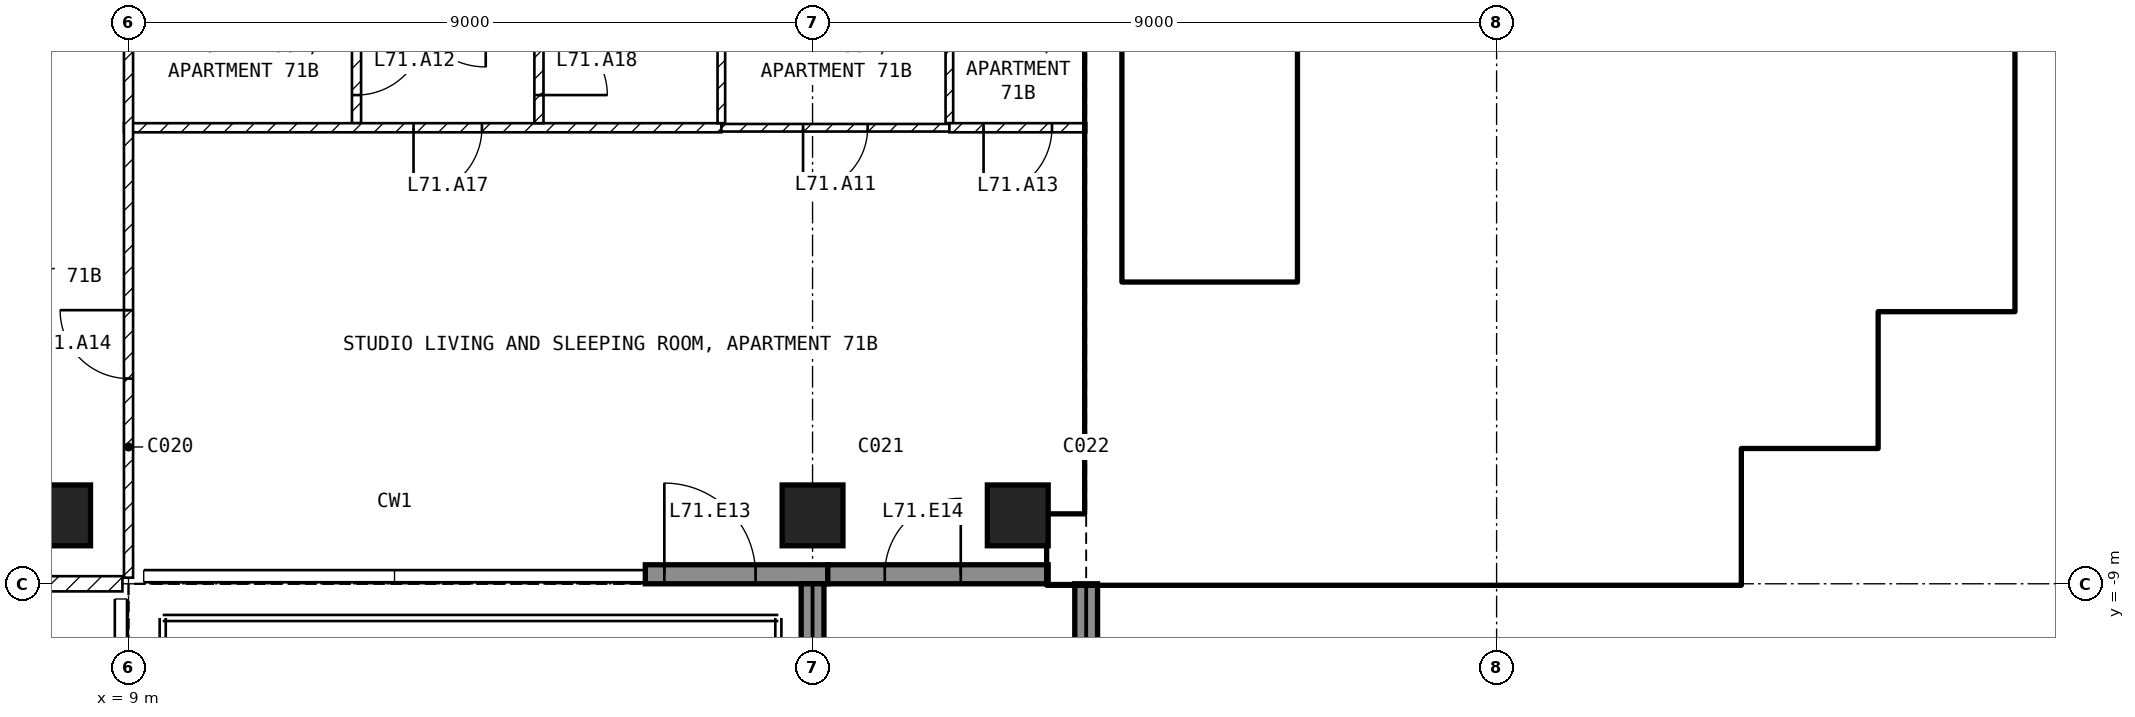
"""IFC4 building model, lengths in metres.
Left out: names, types, materials, properties, quantities, classifications, styles, units other than length and angle.
Written with IfcOpenShell. Run it as: python <this file> out.ifc"""

import sys

from ifc_helpers import new_model, si_unit, direction, frame, frame_2d, origin, origin_2d, place, context, subcontext, project, spatial, rectangle, extrude, element, fill, save


model = new_model("IFC4")
c1 = context("Model", 3, precision=1e-05, world=origin(), true_north=direction((0.0, 1.0)))
c2 = subcontext(c1, "Body", "Model", "MODEL_VIEW")
j1 = project(units=[si_unit("LENGTHUNIT", "METRE"), si_unit("PLANEANGLEUNIT", "RADIAN")], contexts=[c1])
p1 = place(None, origin())
s1 = spatial("IfcSite", under=j1, at=p1, CompositionType="ELEMENT")
p2 = place(p1, origin())
s2 = spatial("IfcBuilding", under=s1, at=p2, CompositionType="ELEMENT")
p3 = place(p2, frame((0.0, 0.0, 278.0)))
s3 = spatial("IfcBuildingStorey", under=s2, at=p3, CompositionType="ELEMENT", Elevation=278.0)
for number, where, z_axis, x_axis in (
    (1, (8.1, -8.1, -0.25), (0.0, 0.0, 1.0), (1.0, 0.0, 0.0)),
    (2, (18.0, -8.1, -0.25), (0.0, 0.0, 1.0), (1.0, 0.0, 0.0)),
    (3, (20.7, -8.1, -0.25), (0.0, 0.0, 1.0), (1.0, 0.0, 0.0)),
):
    element("IfcColumn", number, at=place(p3, frame(where, z_axis=z_axis, x_axis=x_axis)), inside=s3, PredefinedType="COLUMN", context=c2, shape_type="SweptSolid", body=[
        extrude(rectangle(XDim=0.8, YDim=0.8, at=origin_2d()), origin(), (0.0, 0.0, 1.0), 3.5),
    ])
p4 = place(p3, frame((15.8, -8.875, 0.0), z_axis=(0.0, 0.0, 1.0), x_axis=(1.0, 0.0, 0.0)))
e4 = element("IfcWall", 4, at=p4, inside=s3, PredefinedType="SOLIDWALL", context=c2, shape_type="SweptSolid", body=[
    extrude(rectangle(XDim=2.4, YDim=0.25, at=frame_2d((1.2, 0.0))), origin(), (0.0, 0.0, 1.0), 3.25),
])
p5 = place(p4, frame((0.25, 0.0, 0.0)))
e5 = element("IfcOpeningElement", 5, at=p5, cuts=e4, PredefinedType="OPENING", context=c2, shape_type="SweptSolid", body=[
    extrude(rectangle(XDim=1.2, YDim=2.4, at=frame_2d((0.6, 1.2))), frame((0.0, 0.135, 0.0), z_axis=(0.0, -1.0, 0.0), x_axis=(1.0, 0.0, 0.0)), (0.0, 0.0, 1.0), 0.27),
])
p6 = place(p3, frame((18.2, -8.875, 0.0), z_axis=(0.0, 0.0, 1.0), x_axis=(1.0, 0.0, 0.0)))
e6 = element("IfcWall", 6, at=p6, inside=s3, PredefinedType="SOLIDWALL", context=c2, shape_type="SweptSolid", body=[
    extrude(rectangle(XDim=2.9, YDim=0.25, at=frame_2d((1.45, 0.0))), origin(), (0.0, 0.0, 1.0), 3.25),
])
p7 = place(p6, frame((0.75, 0.0, 0.0)))
e7 = element("IfcOpeningElement", 7, at=p7, cuts=e6, PredefinedType="OPENING", context=c2, shape_type="SweptSolid", body=[
    extrude(rectangle(XDim=1.0, YDim=2.4, at=frame_2d((0.5, 1.2))), frame((0.0, 0.135, 0.0), z_axis=(0.0, -1.0, 0.0), x_axis=(1.0, 0.0, 0.0)), (0.0, 0.0, 1.0), 0.27),
])
p8 = place(p3, frame((18.0, -9.0, 0.0), z_axis=(0.0, 0.0, 1.0), x_axis=(0.0, -1.0, 0.0)))
e8 = element("IfcWall", 8, at=p8, inside=s3, PredefinedType="SOLIDWALL", context=c2, shape_type="SweptSolid", body=[
    extrude(rectangle(XDim=2.74, YDim=0.3, at=frame_2d((1.37, 0.0))), origin(), (0.0, 0.0, 1.0), 3.25),
])
p9 = place(p3, frame((21.6, -9.0, 0.0), z_axis=(0.0, 0.0, 1.0), x_axis=(0.0, -1.0, 0.0)))
e9 = element("IfcWall", 9, at=p9, inside=s3, PredefinedType="SOLIDWALL", context=c2, shape_type="SweptSolid", body=[
    extrude(rectangle(XDim=2.7, YDim=0.3, at=frame_2d((1.35, 0.0))), origin(), (0.0, 0.0, 1.0), 3.25),
])
p10 = place(p3, frame((21.1, -8.55, 0.0), z_axis=(0.0, 0.0, 1.0), x_axis=(1.0, 0.0, 0.0)))
e10 = element("IfcWall", 10, at=p10, inside=s3, PredefinedType="SHEAR", context=c2, shape_type="SweptSolid", body=[
    extrude(rectangle(XDim=9.1, YDim=0.9, at=frame_2d((4.55, 0.0))), origin(), (0.0, 0.0, 1.0), 3.25),
])
p11 = place(p3, frame((29.975, -8.1, 0.0), z_axis=(0.0, 0.0, 1.0), x_axis=(0.0, 1.0, 0.0)))
e11 = element("IfcWall", 11, at=p11, inside=s3, PredefinedType="SHEAR", context=c2, shape_type="SweptSolid", body=[
    extrude(rectangle(XDim=1.35, YDim=0.45, at=frame_2d((0.675, 0.0))), origin(), (0.0, 0.0, 1.0), 3.25),
])
for number, where, z_axis, x_axis in (
    (12, (30.2, -6.975, 0.0), (0.0, 0.0, 1.0), (1.0, 0.0, 0.0)),
    (13, (31.775, -6.75, 0.0), (0.0, 0.0, 1.0), (0.0, 1.0, 0.0)),
    (14, (32.0, -5.175, 0.0), (0.0, 0.0, 1.0), (1.0, 0.0, 0.0)),
):
    element("IfcWall", number, at=place(p3, frame(where, z_axis=z_axis, x_axis=x_axis)), inside=s3, PredefinedType="SHEAR", context=c2, shape_type="SweptSolid", body=[
        extrude(rectangle(XDim=1.8, YDim=0.45, at=frame_2d((0.9, 0.0))), origin(), (0.0, 0.0, 1.0), 3.25),
    ])
p12 = place(p3, frame((33.575, -4.95, 0.0), z_axis=(0.0, 0.0, 1.0), x_axis=(0.0, 1.0, 0.0)))
e15 = element("IfcWall", 15, at=p12, inside=s3, PredefinedType="SHEAR", context=c2, shape_type="SweptSolid", body=[
    extrude(rectangle(XDim=10.35, YDim=0.45, at=frame_2d((5.175, 0.0))), origin(), (0.0, 0.0, 1.0), 3.25),
])
p13 = place(p3, frame((21.825, -8.1, 0.0), z_axis=(0.0, 0.0, 1.0), x_axis=(0.0, 1.0, 0.0)))
e16 = element("IfcWall", 16, at=p13, inside=s3, PredefinedType="SHEAR", context=c2, shape_type="SweptSolid", body=[
    extrude(rectangle(XDim=6.9, YDim=0.45, at=frame_2d((3.45, 0.0))), origin(), (0.0, 0.0, 1.0), 3.25),
])
p14 = place(p3, frame((24.5, -5.05, 0.0), z_axis=(0.0, 0.0, 1.0), x_axis=(0.0, 1.0, 0.0)))
e17 = element("IfcWall", 17, at=p14, inside=s3, PredefinedType="SOLIDWALL", context=c2, shape_type="SweptSolid", body=[
    extrude(rectangle(XDim=3.7, YDim=0.2, at=frame_2d((1.85, 0.0))), origin(), (0.0, 0.0, 1.0), 3.25),
])
p15 = place(p14, frame((0.1, 0.0, 0.0)))
e18 = element("IfcOpeningElement", 18, at=p15, cuts=e17, PredefinedType="OPENING", context=c2, shape_type="SweptSolid", body=[
    extrude(rectangle(XDim=0.8, YDim=2.1, at=frame_2d((0.4, 1.05))), frame((0.0, 0.11, 0.0), z_axis=(0.0, -1.0, 0.0), x_axis=(1.0, 0.0, 0.0)), (0.0, 0.0, 1.0), 0.22),
])
p16 = place(p3, frame((22.05, -5.15, 0.0), z_axis=(0.0, 0.0, 1.0), x_axis=(1.0, 0.0, 0.0)))
e19 = element("IfcWall", 19, at=p16, inside=s3, PredefinedType="SOLIDWALL", context=c2, shape_type="SweptSolid", body=[
    extrude(rectangle(XDim=6.3, YDim=0.2, at=frame_2d((3.15, 0.0))), origin(), (0.0, 0.0, 1.0), 3.25),
])
p17 = place(p16, frame((0.2, 0.0, 0.0)))
e20 = element("IfcOpeningElement", 20, at=p17, cuts=e19, PredefinedType="OPENING", context=c2, shape_type="SweptSolid", body=[
    extrude(rectangle(XDim=1.0, YDim=2.1, at=frame_2d((0.5, 1.05))), frame((0.0, 0.11, 0.0), z_axis=(0.0, -1.0, 0.0), x_axis=(1.0, 0.0, 0.0)), (0.0, 0.0, 1.0), 0.22),
])
p18 = place(p3, frame((28.25, -8.1, 0.0), z_axis=(0.0, 0.0, 1.0), x_axis=(0.0, 1.0, 0.0)))
e21 = element("IfcWall", 21, at=p18, inside=s3, PredefinedType="SOLIDWALL", context=c2, shape_type="SweptSolid", body=[
    extrude(rectangle(XDim=2.85, YDim=0.2, at=frame_2d((1.425, 0.0))), origin(), (0.0, 0.0, 1.0), 3.25),
])
p19 = place(p3, frame((24.6, -3.95, 0.0), z_axis=(0.0, 0.0, 1.0), x_axis=(1.0, 0.0, 0.0)))
e22 = element("IfcWall", 22, at=p19, inside=s3, PredefinedType="SOLIDWALL", context=c2, shape_type="SweptSolid", body=[
    extrude(rectangle(XDim=8.75, YDim=0.2, at=frame_2d((4.375, 0.0))), origin(), (0.0, 0.0, 1.0), 3.25),
])
for number, where, z_axis, x_axis in (
    (23, (26.5, -3.85, 0.0), (0.0, 0.0, 1.0), (0.0, 1.0, 0.0)),
    (24, (28.5, -3.85, 0.0), (0.0, 0.0, 1.0), (0.0, 1.0, 0.0)),
    (25, (30.5, -3.85, 0.0), (0.0, 0.0, 1.0), (0.0, 1.0, 0.0)),
):
    element("IfcWall", number, at=place(p3, frame(where, z_axis=z_axis, x_axis=x_axis)), inside=s3, PredefinedType="SOLIDWALL", context=c2, shape_type="SweptSolid", body=[
        extrude(rectangle(XDim=2.3, YDim=0.2, at=frame_2d((1.15, 0.0))), origin(), (0.0, 0.0, 1.0), 3.25),
    ])
p20 = place(p3, frame((27.4, -5.05, 0.0), z_axis=(0.0, 0.0, 1.0), x_axis=(0.0, 1.0, 0.0)))
e26 = element("IfcWall", 26, at=p20, inside=s3, PredefinedType="PARTITIONING", context=c2, shape_type="SweptSolid", body=[
    extrude(rectangle(XDim=1.0, YDim=0.15, at=frame_2d((0.5, 0.0))), origin(), (0.0, 0.0, 1.0), 3.25),
])
p21 = place(p20, frame((0.1, 0.0, 0.0)))
e27 = element("IfcOpeningElement", 27, at=p21, cuts=e26, PredefinedType="OPENING", context=c2, shape_type="SweptSolid", body=[
    extrude(rectangle(XDim=0.8, YDim=2.1, at=frame_2d((0.4, 1.05))), frame((0.0, 0.085, 0.0), z_axis=(0.0, -1.0, 0.0), x_axis=(1.0, 0.0, 0.0)), (0.0, 0.0, 1.0), 0.17),
])
p22 = place(p3, frame((8.92, -9.0, 0.0), z_axis=(0.0, 0.0, 1.0), x_axis=(-1.0, 0.0, 0.0)))
e28 = element("IfcWall", 28, at=p22, inside=s3, PredefinedType="PARTITIONING", context=c2, shape_type="SweptSolid", body=[
    extrude(rectangle(XDim=17.84, YDim=0.2, at=frame_2d((8.92, 0.0))), origin(), (0.0, 0.0, 1.0), 3.25),
])
p23 = place(p22, frame((8.42, 0.0, 0.0)))
e29 = element("IfcOpeningElement", 29, at=p23, cuts=e28, PredefinedType="OPENING", context=c2, shape_type="SweptSolid", body=[
    extrude(rectangle(XDim=1.0, YDim=2.1, at=frame_2d((0.5, 1.05))), frame((0.0, 0.11, 0.0), z_axis=(0.0, -1.0, 0.0), x_axis=(1.0, 0.0, 0.0)), (0.0, 0.0, 1.0), 0.22),
])
p24 = place(p3, frame((12.0, -1.3, 0.0), z_axis=(0.0, 0.0, 1.0), x_axis=(0.0, -1.0, 0.0)))
e30 = element("IfcWall", 30, at=p24, inside=s3, PredefinedType="PARTITIONING", context=c2, shape_type="SweptSolid", body=[
    extrude(rectangle(XDim=1.64, YDim=0.12, at=frame_2d((0.82, 0.0))), origin(), (0.0, 0.0, 1.0), 3.25),
])
p25 = place(p24, frame((0.37, 0.0, 0.0)))
e31 = element("IfcOpeningElement", 31, at=p25, cuts=e30, PredefinedType="OPENING", context=c2, shape_type="SweptSolid", body=[
    extrude(rectangle(XDim=0.9, YDim=2.1, at=frame_2d((0.45, 1.05))), frame((0.0, 0.07, 0.0), z_axis=(0.0, -1.0, 0.0), x_axis=(1.0, 0.0, 0.0)), (0.0, 0.0, 1.0), 0.14),
])
p26 = place(p3, frame((16.8, -3.0, 0.0), z_axis=(0.0, 0.0, 1.0), x_axis=(-1.0, 0.0, 0.0)))
e32 = element("IfcWall", 32, at=p26, inside=s3, PredefinedType="PARTITIONING", context=c2, shape_type="SweptSolid", body=[
    extrude(rectangle(XDim=7.86, YDim=0.12, at=frame_2d((3.93, 0.0))), origin(), (0.0, 0.0, 1.0), 3.25),
])
p27 = place(p26, frame((3.15, 0.0, 0.0)))
e33 = element("IfcOpeningElement", 33, at=p27, cuts=e32, PredefinedType="OPENING", context=c2, shape_type="SweptSolid", body=[
    extrude(rectangle(XDim=0.9, YDim=2.1, at=frame_2d((0.45, 1.05))), frame((0.0, 0.07, 0.0), z_axis=(0.0, -1.0, 0.0), x_axis=(1.0, 0.0, 0.0)), (0.0, 0.0, 1.0), 0.14),
])
p28 = place(p3, frame((9.0, -8.92, 0.0), z_axis=(0.0, 0.0, 1.0), x_axis=(0.0, 1.0, 0.0)))
e34 = element("IfcWall", 34, at=p28, inside=s3, PredefinedType="PARTITIONING", context=c2, shape_type="SweptSolid", body=[
    extrude(rectangle(XDim=7.62, YDim=0.12, at=frame_2d((3.81, 0.0))), origin(), (0.0, 0.0, 1.0), 3.25),
])
p29 = place(p28, frame((2.62, 0.0, 0.0)))
e35 = element("IfcOpeningElement", 35, at=p29, cuts=e34, PredefinedType="OPENING", context=c2, shape_type="SweptSolid", body=[
    extrude(rectangle(XDim=0.9, YDim=2.1, at=frame_2d((0.45, 1.05))), frame((0.0, 0.07, 0.0), z_axis=(0.0, -1.0, 0.0), x_axis=(1.0, 0.0, 0.0)), (0.0, 0.0, 1.0), 0.14),
])
p30 = place(p3, frame((14.4, -1.3, 0.0), z_axis=(0.0, 0.0, 1.0), x_axis=(0.0, -1.0, 0.0)))
e36 = element("IfcWall", 36, at=p30, inside=s3, PredefinedType="PARTITIONING", context=c2, shape_type="SweptSolid", body=[
    extrude(rectangle(XDim=1.64, YDim=0.12, at=frame_2d((0.82, 0.0))), origin(), (0.0, 0.0, 1.0), 3.25),
])
p31 = place(p30, frame((0.37, 0.0, 0.0)))
e37 = element("IfcOpeningElement", 37, at=p31, cuts=e36, PredefinedType="OPENING", context=c2, shape_type="SweptSolid", body=[
    extrude(rectangle(XDim=0.9, YDim=2.1, at=frame_2d((0.45, 1.05))), frame((0.0, 0.07, 0.0), z_axis=(0.0, -1.0, 0.0), x_axis=(1.0, 0.0, 0.0)), (0.0, 0.0, 1.0), 0.14),
])
for number, where, z_axis, x_axis in (
    (38, (16.8, -1.3, 0.0), (0.0, 0.0, 1.0), (0.0, -1.0, 0.0)),
    (39, (19.8, -1.3, 0.0), (0.0, 0.0, 1.0), (0.0, -1.0, 0.0)),
):
    element("IfcWall", number, at=place(p3, frame(where, z_axis=z_axis, x_axis=x_axis)), inside=s3, PredefinedType="PARTITIONING", context=c2, shape_type="SweptSolid", body=[
        extrude(rectangle(XDim=1.64, YDim=0.1, at=frame_2d((0.82, 0.0))), origin(), (0.0, 0.0, 1.0), 3.25),
    ])
p32 = place(p3, frame((19.8, -3.0, 0.0), z_axis=(0.0, 0.0, 1.0), x_axis=(-1.0, 0.0, 0.0)))
e40 = element("IfcWall", 40, at=p32, inside=s3, PredefinedType="PARTITIONING", context=c2, shape_type="SweptSolid", body=[
    extrude(rectangle(XDim=3.0, YDim=0.1, at=frame_2d((1.5, 0.0))), origin(), (0.0, 0.0, 1.0), 3.25),
])
p33 = place(p32, frame((1.075, 0.0, 0.0)))
e41 = element("IfcOpeningElement", 41, at=p33, cuts=e40, PredefinedType="OPENING", context=c2, shape_type="SweptSolid", body=[
    extrude(rectangle(XDim=0.85, YDim=2.1, at=frame_2d((0.425, 1.05))), frame((0.0, 0.06, 0.0), z_axis=(0.0, -1.0, 0.0), x_axis=(1.0, 0.0, 0.0)), (0.0, 0.0, 1.0), 0.12),
])
p34 = place(p3, frame((21.6, -3.0, 0.0), z_axis=(0.0, 0.0, 1.0), x_axis=(-1.0, 0.0, 0.0)))
e42 = element("IfcWall", 42, at=p34, inside=s3, PredefinedType="PARTITIONING", context=c2, shape_type="SweptSolid", body=[
    extrude(rectangle(XDim=1.8, YDim=0.12, at=frame_2d((0.9, 0.0))), origin(), (0.0, 0.0, 1.0), 3.25),
])
p35 = place(p34, frame((0.45, 0.0, 0.0)))
e43 = element("IfcOpeningElement", 43, at=p35, cuts=e42, PredefinedType="OPENING", context=c2, shape_type="SweptSolid", body=[
    extrude(rectangle(XDim=0.9, YDim=2.1, at=frame_2d((0.45, 1.05))), frame((0.0, 0.07, 0.0), z_axis=(0.0, -1.0, 0.0), x_axis=(1.0, 0.0, 0.0)), (0.0, 0.0, 1.0), 0.14),
])
p36 = place(p5, origin())
e44 = element("IfcDoor", 44, at=p36, inside=s3, OperationType="SINGLE_SWING_LEFT", PredefinedType="DOOR", context=c2, shape_type="SweptSolid", body=[
    extrude(rectangle(XDim=1.2, YDim=2.4, at=frame_2d((0.6, 1.2))), frame((0.0, 0.025, 0.0), z_axis=(0.0, -1.0, 0.0), x_axis=(1.0, 0.0, 0.0)), (0.0, 0.0, 1.0), 0.05),
])
fill(e5, e44)
p37 = place(p7, origin())
e45 = element("IfcDoor", 45, at=p37, inside=s3, OperationType="SINGLE_SWING_RIGHT", PredefinedType="DOOR", context=c2, shape_type="SweptSolid", body=[
    extrude(rectangle(XDim=1.0, YDim=2.4, at=frame_2d((0.5, 1.2))), frame((0.0, 0.025, 0.0), z_axis=(0.0, -1.0, 0.0), x_axis=(1.0, 0.0, 0.0)), (0.0, 0.0, 1.0), 0.05),
])
fill(e7, e45)
p38 = place(p17, origin())
e46 = element("IfcDoor", 46, at=p38, inside=s3, OperationType="SINGLE_SWING_LEFT", PredefinedType="DOOR", context=c2, shape_type="SweptSolid", body=[
    extrude(rectangle(XDim=1.0, YDim=2.1, at=frame_2d((0.5, 1.05))), frame((0.0, 0.025, 0.0), z_axis=(0.0, -1.0, 0.0), x_axis=(1.0, 0.0, 0.0)), (0.0, 0.0, 1.0), 0.05),
])
fill(e20, e46)
p39 = place(p15, origin())
e47 = element("IfcDoor", 47, at=p39, inside=s3, OperationType="SINGLE_SWING_LEFT", PredefinedType="DOOR", context=c2, shape_type="SweptSolid", body=[
    extrude(rectangle(XDim=0.8, YDim=2.1, at=frame_2d((0.4, 1.05))), frame((0.0, 0.025, 0.0), z_axis=(0.0, -1.0, 0.0), x_axis=(1.0, 0.0, 0.0)), (0.0, 0.0, 1.0), 0.05),
])
fill(e18, e47)
p40 = place(p21, origin())
e48 = element("IfcDoor", 48, at=p40, inside=s3, OperationType="SINGLE_SWING_LEFT", PredefinedType="DOOR", context=c2, shape_type="SweptSolid", body=[
    extrude(rectangle(XDim=0.8, YDim=2.1, at=frame_2d((0.4, 1.05))), frame((0.0, 0.025, 0.0), z_axis=(0.0, -1.0, 0.0), x_axis=(1.0, 0.0, 0.0)), (0.0, 0.0, 1.0), 0.05),
])
fill(e27, e48)
p41 = place(p33, origin())
e49 = element("IfcDoor", 49, at=p41, inside=s3, OperationType="SINGLE_SWING_RIGHT", PredefinedType="DOOR", context=c2, shape_type="SweptSolid", body=[
    extrude(rectangle(XDim=0.85, YDim=2.1, at=frame_2d((0.425, 1.05))), frame((0.0, 0.025, 0.0), z_axis=(0.0, -1.0, 0.0), x_axis=(1.0, 0.0, 0.0)), (0.0, 0.0, 1.0), 0.05),
])
fill(e41, e49)
p42 = place(p25, origin())
e50 = element("IfcDoor", 50, at=p42, inside=s3, OperationType="SINGLE_SWING_LEFT", PredefinedType="DOOR", context=c2, shape_type="SweptSolid", body=[
    extrude(rectangle(XDim=0.9, YDim=2.1, at=frame_2d((0.45, 1.05))), frame((0.0, 0.025, 0.0), z_axis=(0.0, -1.0, 0.0), x_axis=(1.0, 0.0, 0.0)), (0.0, 0.0, 1.0), 0.05),
])
fill(e31, e50)
p43 = place(p35, origin())
e51 = element("IfcDoor", 51, at=p43, inside=s3, OperationType="SINGLE_SWING_RIGHT", PredefinedType="DOOR", context=c2, shape_type="SweptSolid", body=[
    extrude(rectangle(XDim=0.9, YDim=2.1, at=frame_2d((0.45, 1.05))), frame((0.0, 0.025, 0.0), z_axis=(0.0, -1.0, 0.0), x_axis=(1.0, 0.0, 0.0)), (0.0, 0.0, 1.0), 0.05),
])
fill(e43, e51)
p44 = place(p29, origin())
e52 = element("IfcDoor", 52, at=p44, inside=s3, OperationType="SINGLE_SWING_RIGHT", PredefinedType="DOOR", context=c2, shape_type="SweptSolid", body=[
    extrude(rectangle(XDim=0.9, YDim=2.1, at=frame_2d((0.45, 1.05))), frame((0.0, 0.025, 0.0), z_axis=(0.0, -1.0, 0.0), x_axis=(1.0, 0.0, 0.0)), (0.0, 0.0, 1.0), 0.05),
])
fill(e35, e52)
p45 = place(p27, origin())
e53 = element("IfcDoor", 53, at=p45, inside=s3, OperationType="SINGLE_SWING_RIGHT", PredefinedType="DOOR", context=c2, shape_type="SweptSolid", body=[
    extrude(rectangle(XDim=0.9, YDim=2.1, at=frame_2d((0.45, 1.05))), frame((0.0, 0.025, 0.0), z_axis=(0.0, -1.0, 0.0), x_axis=(1.0, 0.0, 0.0)), (0.0, 0.0, 1.0), 0.05),
])
fill(e33, e53)
p46 = place(p31, origin())
e54 = element("IfcDoor", 54, at=p46, inside=s3, OperationType="SINGLE_SWING_RIGHT", PredefinedType="DOOR", context=c2, shape_type="SweptSolid", body=[
    extrude(rectangle(XDim=0.9, YDim=2.1, at=frame_2d((0.45, 1.05))), frame((0.0, 0.025, 0.0), z_axis=(0.0, -1.0, 0.0), x_axis=(1.0, 0.0, 0.0)), (0.0, 0.0, 1.0), 0.05),
])
fill(e37, e54)
save(model, sys.argv[1])
